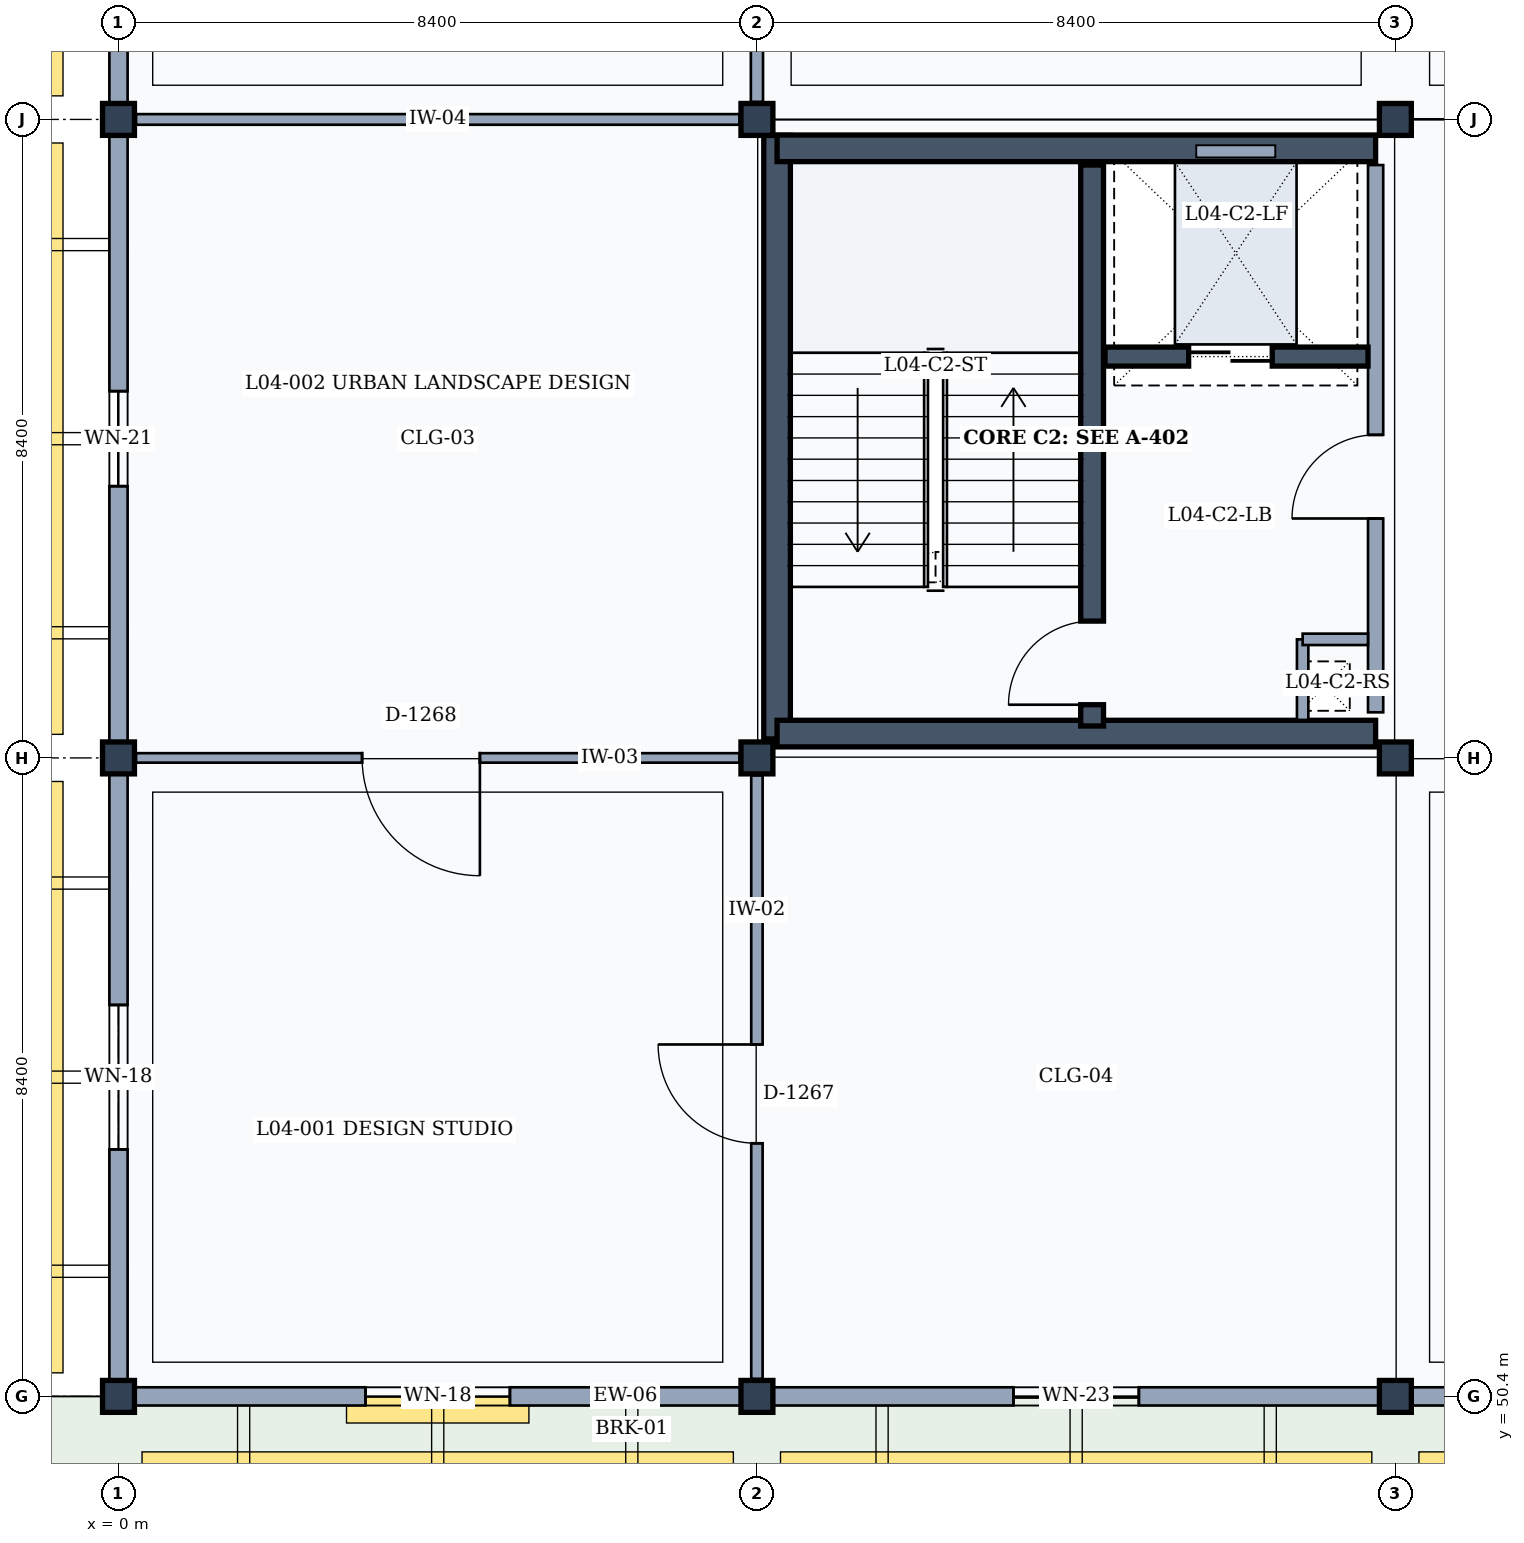
"""IFC4 building model, lengths in metres.
Left out: names, types, materials, properties, quantities, classifications, styles, units other than length and angle.
Written with IfcOpenShell. Run it as: python <this file> out.ifc"""

import sys

from ifc_helpers import new_model, si_unit, direction, frame, frame_2d, origin, origin_2d, place, context, subcontext, project, spatial, rectangle, extrude, element, fill, save


model = new_model("IFC4")
c1 = context("Model", 3, precision=1e-05, world=origin(), true_north=direction((0.0, 1.0)))
c2 = subcontext(c1, "Body", "Model", "MODEL_VIEW")
j1 = project(units=[si_unit("LENGTHUNIT", "METRE"), si_unit("PLANEANGLEUNIT", "RADIAN")], contexts=[c1])
p1 = place(None, origin())
s1 = spatial("IfcSite", under=j1, at=p1, CompositionType="ELEMENT")
p2 = place(p1, origin())
s2 = spatial("IfcBuilding", under=s1, at=p2, CompositionType="ELEMENT")
p3 = place(p2, frame((0.0, 0.0, 18.0)))
s3 = spatial("IfcBuildingStorey", under=s2, at=p3, CompositionType="ELEMENT", Elevation=18.0)
for number, where, z_axis, x_axis in (
    (1, (0.0, 50.4, 0.0), (0.0, 0.0, 1.0), (1.0, 0.0, 0.0)),
    (2, (0.0, 58.8, 0.0), (0.0, 0.0, 1.0), (1.0, 0.0, 0.0)),
    (3, (0.0, 67.2, 0.0), (0.0, 0.0, 1.0), (1.0, 0.0, 0.0)),
    (4, (8.4, 50.4, 0.0), (0.0, 0.0, 1.0), (1.0, 0.0, 0.0)),
    (5, (8.4, 58.8, 0.0), (0.0, 0.0, 1.0), (1.0, 0.0, 0.0)),
    (6, (8.4, 67.2, 0.0), (0.0, 0.0, 1.0), (1.0, 0.0, 0.0)),
    (7, (16.8, 50.4, 0.0), (0.0, 0.0, 1.0), (1.0, 0.0, 0.0)),
    (8, (16.8, 58.8, 0.0), (0.0, 0.0, 1.0), (1.0, 0.0, 0.0)),
    (9, (16.8, 67.2, 0.0), (0.0, 0.0, 1.0), (1.0, 0.0, 0.0)),
):
    element("IfcColumn", number, at=place(p3, frame(where, z_axis=z_axis, x_axis=x_axis)), inside=s3, PredefinedType="COLUMN", context=c2, shape_type="SweptSolid", body=[
        extrude(rectangle(XDim=0.42, YDim=0.42, at=origin_2d()), origin(), (0.0, 0.0, 1.0), 4.2),
    ])
p4 = place(p3, frame((8.19, 50.4, 0.0), z_axis=(0.0, 0.0, 1.0), x_axis=(-1.0, 0.0, 0.0)))
e10 = element("IfcWall", 10, at=p4, inside=s3, PredefinedType="SOLIDWALL", context=c2, shape_type="SweptSolid", body=[
    extrude(rectangle(XDim=7.98, YDim=0.24, at=frame_2d((3.99, 0.0))), origin(), (0.0, 0.0, 1.0), 3.36),
])
p5 = place(p4, frame((3.04, 0.0, 0.9)))
e11 = element("IfcOpeningElement", 11, at=p5, cuts=e10, PredefinedType="OPENING", context=c2, shape_type="SweptSolid", body=[
    extrude(rectangle(XDim=1.9, YDim=2.05, at=frame_2d((0.95, 1.025))), frame((0.0, 0.13, 0.0), z_axis=(0.0, -1.0, 0.0), x_axis=(1.0, 0.0, 0.0)), (0.0, 0.0, 1.0), 0.26),
])
p6 = place(p3, frame((0.0, 50.61, 0.0), z_axis=(0.0, 0.0, 1.0), x_axis=(0.0, 1.0, 0.0)))
e12 = element("IfcWall", 12, at=p6, inside=s3, PredefinedType="SOLIDWALL", context=c2, shape_type="SweptSolid", body=[
    extrude(rectangle(XDim=7.98, YDim=0.24, at=frame_2d((3.99, 0.0))), origin(), (0.0, 0.0, 1.0), 3.36),
])
p7 = place(p6, frame((3.04, 0.0, 0.9)))
e13 = element("IfcOpeningElement", 13, at=p7, cuts=e12, PredefinedType="OPENING", context=c2, shape_type="SweptSolid", body=[
    extrude(rectangle(XDim=1.9, YDim=2.05, at=frame_2d((0.95, 1.025))), frame((0.0, 0.13, 0.0), z_axis=(0.0, -1.0, 0.0), x_axis=(1.0, 0.0, 0.0)), (0.0, 0.0, 1.0), 0.26),
])
p8 = place(p3, frame((0.0, 59.01, 0.0), z_axis=(0.0, 0.0, 1.0), x_axis=(0.0, 1.0, 0.0)))
e14 = element("IfcWall", 14, at=p8, inside=s3, PredefinedType="SOLIDWALL", context=c2, shape_type="SweptSolid", body=[
    extrude(rectangle(XDim=7.98, YDim=0.24, at=frame_2d((3.99, 0.0))), origin(), (0.0, 0.0, 1.0), 3.36),
])
p9 = place(p8, frame((3.365, 0.0, 0.9)))
e15 = element("IfcOpeningElement", 15, at=p9, cuts=e14, PredefinedType="OPENING", context=c2, shape_type="SweptSolid", body=[
    extrude(rectangle(XDim=1.25, YDim=1.7, at=frame_2d((0.625, 0.85))), frame((0.0, 0.13, 0.0), z_axis=(0.0, -1.0, 0.0), x_axis=(1.0, 0.0, 0.0)), (0.0, 0.0, 1.0), 0.26),
])
p10 = place(p3, frame((0.0, 67.41, 0.0), z_axis=(0.0, 0.0, 1.0), x_axis=(0.0, 1.0, 0.0)))
e16 = element("IfcWall", 16, at=p10, inside=s3, PredefinedType="SOLIDWALL", context=c2, shape_type="SweptSolid", body=[
    extrude(rectangle(XDim=7.98, YDim=0.24, at=frame_2d((3.99, 0.0))), origin(), (0.0, 0.0, 1.0), 3.36),
])
p11 = place(p10, frame((3.065, 0.0, 0.9)))
e17 = element("IfcOpeningElement", 17, at=p11, cuts=e16, PredefinedType="OPENING", context=c2, shape_type="SweptSolid", body=[
    extrude(rectangle(XDim=1.85, YDim=1.65, at=frame_2d((0.925, 0.825))), frame((0.0, 0.13, 0.0), z_axis=(0.0, -1.0, 0.0), x_axis=(1.0, 0.0, 0.0)), (0.0, 0.0, 1.0), 0.26),
])
p12 = place(p3, frame((16.59, 50.4, 0.0), z_axis=(0.0, 0.0, 1.0), x_axis=(-1.0, 0.0, 0.0)))
e18 = element("IfcWall", 18, at=p12, inside=s3, PredefinedType="SOLIDWALL", context=c2, shape_type="SweptSolid", body=[
    extrude(rectangle(XDim=7.98, YDim=0.24, at=frame_2d((3.99, 0.0))), origin(), (0.0, 0.0, 1.0), 3.36),
])
p13 = place(p12, frame((3.165, 0.0, 0.9)))
e19 = element("IfcOpeningElement", 19, at=p13, cuts=e18, PredefinedType="OPENING", context=c2, shape_type="SweptSolid", body=[
    extrude(rectangle(XDim=1.65, YDim=1.9, at=frame_2d((0.825, 0.95))), frame((0.0, 0.13, 0.0), z_axis=(0.0, -1.0, 0.0), x_axis=(1.0, 0.0, 0.0)), (0.0, 0.0, 1.0), 0.26),
])
p14 = place(p3, frame((24.99, 50.4, 0.0), z_axis=(0.0, 0.0, 1.0), x_axis=(-1.0, 0.0, 0.0)))
e20 = element("IfcWall", 20, at=p14, inside=s3, PredefinedType="SOLIDWALL", context=c2, shape_type="SweptSolid", body=[
    extrude(rectangle(XDim=7.98, YDim=0.24, at=frame_2d((3.99, 0.0))), origin(), (0.0, 0.0, 1.0), 3.36),
])
p15 = place(p14, frame((2.615, 0.0, 0.9)))
e21 = element("IfcOpeningElement", 21, at=p15, cuts=e20, PredefinedType="OPENING", context=c2, shape_type="SweptSolid", body=[
    extrude(rectangle(XDim=2.75, YDim=1.85, at=frame_2d((1.375, 0.925))), frame((0.0, 0.13, 0.0), z_axis=(0.0, -1.0, 0.0), x_axis=(1.0, 0.0, 0.0)), (0.0, 0.0, 1.0), 0.26),
])
p16 = place(p3, frame((8.665, 59.05, 0.0), z_axis=(0.0, 0.0, 1.0), x_axis=(0.0, 1.0, 0.0)))
e22 = element("IfcWall", 22, at=p16, inside=s3, PredefinedType="SHEAR", context=c2, shape_type="SweptSolid", body=[
    extrude(rectangle(XDim=7.94, YDim=0.35, at=frame_2d((3.97, 0.0))), origin(), (0.0, 0.0, 1.0), 3.98),
])
p17 = place(p3, frame((8.665, 66.82, 0.0), z_axis=(0.0, 0.0, 1.0), x_axis=(1.0, 0.0, 0.0)))
e23 = element("IfcWall", 23, at=p17, inside=s3, PredefinedType="SHEAR", context=c2, shape_type="SweptSolid", body=[
    extrude(rectangle(XDim=7.875, YDim=0.35, at=frame_2d((3.938, 0.0))), origin(), (0.0, 0.0, 1.0), 3.98),
])
p18 = place(p3, frame((16.54, 66.6, 0.0), z_axis=(0.0, 0.0, 1.0), x_axis=(0.0, -1.0, 0.0)))
e24 = element("IfcWall", 24, at=p18, inside=s3, PredefinedType="PARTITIONING", context=c2, shape_type="SweptSolid", body=[
    extrude(rectangle(XDim=7.2, YDim=0.2, at=frame_2d((3.6, 0.0))), origin(), (0.0, 0.0, 1.0), 3.32),
])
p19 = place(p18, frame((3.55, 0.0, 0.0)))
e25 = element("IfcOpeningElement", 25, at=p19, cuts=e24, PredefinedType="OPENING", context=c2, shape_type="SweptSolid", body=[
    extrude(rectangle(XDim=1.1, YDim=2.15, at=frame_2d((0.55, 1.075))), frame((0.0, 0.11, 0.0), z_axis=(0.0, -1.0, 0.0), x_axis=(1.0, 0.0, 0.0)), (0.0, 0.0, 1.0), 0.22),
])
p20 = place(p3, frame((16.54, 59.12, 0.0), z_axis=(0.0, 0.0, 1.0), x_axis=(-1.0, 0.0, 0.0)))
e26 = element("IfcWall", 26, at=p20, inside=s3, PredefinedType="SHEAR", context=c2, shape_type="SweptSolid", body=[
    extrude(rectangle(XDim=7.875, YDim=0.35, at=frame_2d((3.938, 0.0))), origin(), (0.0, 0.0, 1.0), 3.98),
])
p21 = place(p3, frame((12.81, 59.22, 0.0), z_axis=(0.0, 0.0, 1.0), x_axis=(0.0, 1.0, 0.0)))
e27 = element("IfcWall", 27, at=p21, inside=s3, PredefinedType="SHEAR", context=c2, shape_type="SweptSolid", body=[
    extrude(rectangle(XDim=7.38, YDim=0.3, at=frame_2d((3.69, 0.0))), origin(), (0.0, 0.0, 1.0), 3.98),
])
p22 = place(p21, frame((0.28, 0.0, 0.0)))
e28 = element("IfcOpeningElement", 28, at=p22, cuts=e27, PredefinedType="OPENING", context=c2, shape_type="SweptSolid", body=[
    extrude(rectangle(XDim=1.1, YDim=2.15, at=frame_2d((0.55, 1.075))), frame((0.0, 0.16, 0.0), z_axis=(0.0, -1.0, 0.0), x_axis=(1.0, 0.0, 0.0)), (0.0, 0.0, 1.0), 0.32),
])
p23 = place(p3, frame((15.58, 60.36, 0.0), z_axis=(0.0, 0.0, 1.0), x_axis=(0.0, -1.0, 0.0)))
e29 = element("IfcWall", 29, at=p23, inside=s3, PredefinedType="PARTITIONING", context=c2, shape_type="SweptSolid", body=[
    extrude(rectangle(XDim=1.06, YDim=0.15, at=frame_2d((0.53, 0.0))), origin(), (0.0, 0.0, 1.0), 3.32),
])
p24 = place(p3, frame((15.58, 60.36, 0.0), z_axis=(0.0, 0.0, 1.0), x_axis=(1.0, 0.0, 0.0)))
e30 = element("IfcWall", 30, at=p24, inside=s3, PredefinedType="PARTITIONING", context=c2, shape_type="SweptSolid", body=[
    extrude(rectangle(XDim=0.86, YDim=0.15, at=frame_2d((0.43, 0.0))), origin(), (0.0, 0.0, 1.0), 3.32),
])
p25 = place(p3, frame((12.98, 64.08, 0.0), z_axis=(0.0, 0.0, 1.0), x_axis=(1.0, 0.0, 0.0)))
e31 = element("IfcWall", 31, at=p25, inside=s3, PredefinedType="SHEAR", context=c2, shape_type="SweptSolid", body=[
    extrude(rectangle(XDim=3.46, YDim=0.25, at=frame_2d((1.73, 0.0))), origin(), (0.0, 0.0, 1.0), 3.98),
])
p26 = place(p25, frame((1.1, 0.0, 0.0)))
e32 = element("IfcOpeningElement", 32, at=p26, cuts=e31, PredefinedType="OPENING", context=c2, shape_type="SweptSolid", body=[
    extrude(rectangle(XDim=1.1, YDim=2.15, at=frame_2d((0.55, 1.075))), frame((0.0, 0.135, 0.0), z_axis=(0.0, -1.0, 0.0), x_axis=(1.0, 0.0, 0.0)), (0.0, 0.0, 1.0), 0.27),
])
p27 = place(p3, frame((8.4, 50.63, 0.0), z_axis=(0.0, 0.0, 1.0), x_axis=(0.0, 1.0, 0.0)))
e33 = element("IfcWall", 33, at=p27, inside=s3, PredefinedType="PARTITIONING", context=c2, shape_type="SweptSolid", body=[
    extrude(rectangle(XDim=7.94, YDim=0.15, at=frame_2d((3.97, 0.0))), origin(), (0.0, 0.0, 1.0), 3.32),
])
p28 = place(p27, frame((3.1, 0.0, 0.0)))
e34 = element("IfcOpeningElement", 34, at=p28, cuts=e33, PredefinedType="OPENING", context=c2, shape_type="SweptSolid", body=[
    extrude(rectangle(XDim=1.3, YDim=2.2, at=frame_2d((0.65, 1.1))), frame((0.0, 0.085, 0.0), z_axis=(0.0, -1.0, 0.0), x_axis=(1.0, 0.0, 0.0)), (0.0, 0.0, 1.0), 0.17),
])
p29 = place(p3, frame((0.23, 58.8, 0.0), z_axis=(0.0, 0.0, 1.0), x_axis=(1.0, 0.0, 0.0)))
e35 = element("IfcWall", 35, at=p29, inside=s3, PredefinedType="PARTITIONING", context=c2, shape_type="SweptSolid", body=[
    extrude(rectangle(XDim=7.94, YDim=0.125, at=frame_2d((3.97, 0.0))), origin(), (0.0, 0.0, 1.0), 3.32),
])
p30 = place(p29, frame((2.975, 0.0, 0.0)))
e36 = element("IfcOpeningElement", 36, at=p30, cuts=e35, PredefinedType="OPENING", context=c2, shape_type="SweptSolid", body=[
    extrude(rectangle(XDim=1.55, YDim=2.35, at=frame_2d((0.775, 1.175))), frame((0.0, 0.073, 0.0), z_axis=(0.0, -1.0, 0.0), x_axis=(1.0, 0.0, 0.0)), (0.0, 0.0, 1.0), 0.145),
])
p31 = place(p3, frame((0.23, 67.2, 0.0), z_axis=(0.0, 0.0, 1.0), x_axis=(1.0, 0.0, 0.0)))
e37 = element("IfcWall", 37, at=p31, inside=s3, PredefinedType="PARTITIONING", context=c2, shape_type="SweptSolid", body=[
    extrude(rectangle(XDim=7.94, YDim=0.14, at=frame_2d((3.97, 0.0))), origin(), (0.0, 0.0, 1.0), 3.32),
])
p32 = place(p3, frame((8.4, 67.43, 0.0), z_axis=(0.0, 0.0, 1.0), x_axis=(0.0, 1.0, 0.0)))
e38 = element("IfcWall", 38, at=p32, inside=s3, PredefinedType="PARTITIONING", context=c2, shape_type="SweptSolid", body=[
    extrude(rectangle(XDim=7.94, YDim=0.16, at=frame_2d((3.97, 0.0))), origin(), (0.0, 0.0, 1.0), 3.32),
])
p33 = place(p32, frame((2.9, 0.0, 0.0)))
e39 = element("IfcOpeningElement", 39, at=p33, cuts=e38, PredefinedType="OPENING", context=c2, shape_type="SweptSolid", body=[
    extrude(rectangle(XDim=1.7, YDim=2.3, at=frame_2d((0.85, 1.15))), frame((0.0, 0.09, 0.0), z_axis=(0.0, -1.0, 0.0), x_axis=(1.0, 0.0, 0.0)), (0.0, 0.0, 1.0), 0.18),
])
p34 = place(p5, origin())
e40 = element("IfcWindow", 40, at=p34, inside=s3, PartitioningType="SINGLE_PANEL", PredefinedType="WINDOW", context=c2, shape_type="SweptSolid", body=[
    extrude(rectangle(XDim=1.9, YDim=2.05, at=frame_2d((0.95, 1.025))), frame((0.0, 0.03, 0.0), z_axis=(0.0, -1.0, 0.0), x_axis=(1.0, 0.0, 0.0)), (0.0, 0.0, 1.0), 0.06),
])
fill(e11, e40)
p35 = place(p7, origin())
e41 = element("IfcWindow", 41, at=p35, inside=s3, PartitioningType="SINGLE_PANEL", PredefinedType="WINDOW", context=c2, shape_type="SweptSolid", body=[
    extrude(rectangle(XDim=1.9, YDim=2.05, at=frame_2d((0.95, 1.025))), frame((0.0, 0.03, 0.0), z_axis=(0.0, -1.0, 0.0), x_axis=(1.0, 0.0, 0.0)), (0.0, 0.0, 1.0), 0.06),
])
fill(e13, e41)
p36 = place(p9, origin())
e42 = element("IfcWindow", 42, at=p36, inside=s3, PartitioningType="SINGLE_PANEL", PredefinedType="WINDOW", context=c2, shape_type="SweptSolid", body=[
    extrude(rectangle(XDim=1.25, YDim=1.7, at=frame_2d((0.625, 0.85))), frame((0.0, 0.03, 0.0), z_axis=(0.0, -1.0, 0.0), x_axis=(1.0, 0.0, 0.0)), (0.0, 0.0, 1.0), 0.06),
])
fill(e15, e42)
p37 = place(p13, origin())
e43 = element("IfcWindow", 43, at=p37, inside=s3, PartitioningType="SINGLE_PANEL", PredefinedType="WINDOW", context=c2, shape_type="SweptSolid", body=[
    extrude(rectangle(XDim=1.65, YDim=1.9, at=frame_2d((0.825, 0.95))), frame((0.0, 0.03, 0.0), z_axis=(0.0, -1.0, 0.0), x_axis=(1.0, 0.0, 0.0)), (0.0, 0.0, 1.0), 0.06),
])
fill(e19, e43)
p38 = place(p19, frame((1.1, 0.0, 0.0), z_axis=(0.0, 0.0, 1.0), x_axis=(-1.0, 0.0, 0.0)))
e44 = element("IfcDoor", 44, at=p38, inside=s3, OperationType="SINGLE_SWING_LEFT", PredefinedType="DOOR", context=c2, shape_type="SweptSolid", body=[
    extrude(rectangle(XDim=1.1, YDim=2.15, at=frame_2d((0.55, 1.075))), frame((0.0, 0.025, 0.0), z_axis=(0.0, -1.0, 0.0), x_axis=(1.0, 0.0, 0.0)), (0.0, 0.0, 1.0), 0.05),
])
fill(e25, e44)
p39 = place(p22, origin())
e45 = element("IfcDoor", 45, at=p39, inside=s3, OperationType="SINGLE_SWING_LEFT", PredefinedType="DOOR", context=c2, shape_type="SweptSolid", body=[
    extrude(rectangle(XDim=1.1, YDim=2.15, at=frame_2d((0.55, 1.075))), frame((0.0, 0.025, 0.0), z_axis=(0.0, -1.0, 0.0), x_axis=(1.0, 0.0, 0.0)), (0.0, 0.0, 1.0), 0.05),
])
fill(e28, e45)
p40 = place(p26, origin())
e46 = element("IfcDoor", 46, at=p40, inside=s3, OperationType="DOUBLE_DOOR_SLIDING", PredefinedType="DOOR", context=c2, shape_type="SweptSolid", body=[
    extrude(rectangle(XDim=1.1, YDim=2.15, at=frame_2d((0.55, 1.075))), frame((0.0, 0.025, 0.0), z_axis=(0.0, -1.0, 0.0), x_axis=(1.0, 0.0, 0.0)), (0.0, 0.0, 1.0), 0.05),
])
fill(e32, e46)
p41 = place(p28, origin())
e47 = element("IfcDoor", 47, at=p41, inside=s3, OperationType="SINGLE_SWING_RIGHT", PredefinedType="DOOR", context=c2, shape_type="SweptSolid", body=[
    extrude(rectangle(XDim=1.3, YDim=2.2, at=frame_2d((0.65, 1.1))), frame((0.0, 0.025, 0.0), z_axis=(0.0, -1.0, 0.0), x_axis=(1.0, 0.0, 0.0)), (0.0, 0.0, 1.0), 0.05),
])
fill(e34, e47)
p42 = place(p30, frame((1.55, 0.0, 0.0), z_axis=(0.0, 0.0, 1.0), x_axis=(-1.0, 0.0, 0.0)))
e48 = element("IfcDoor", 48, at=p42, inside=s3, OperationType="SINGLE_SWING_LEFT", PredefinedType="DOOR", context=c2, shape_type="SweptSolid", body=[
    extrude(rectangle(XDim=1.55, YDim=2.35, at=frame_2d((0.775, 1.175))), frame((0.0, 0.025, 0.0), z_axis=(0.0, -1.0, 0.0), x_axis=(1.0, 0.0, 0.0)), (0.0, 0.0, 1.0), 0.05),
])
fill(e36, e48)
save(model, sys.argv[1])
